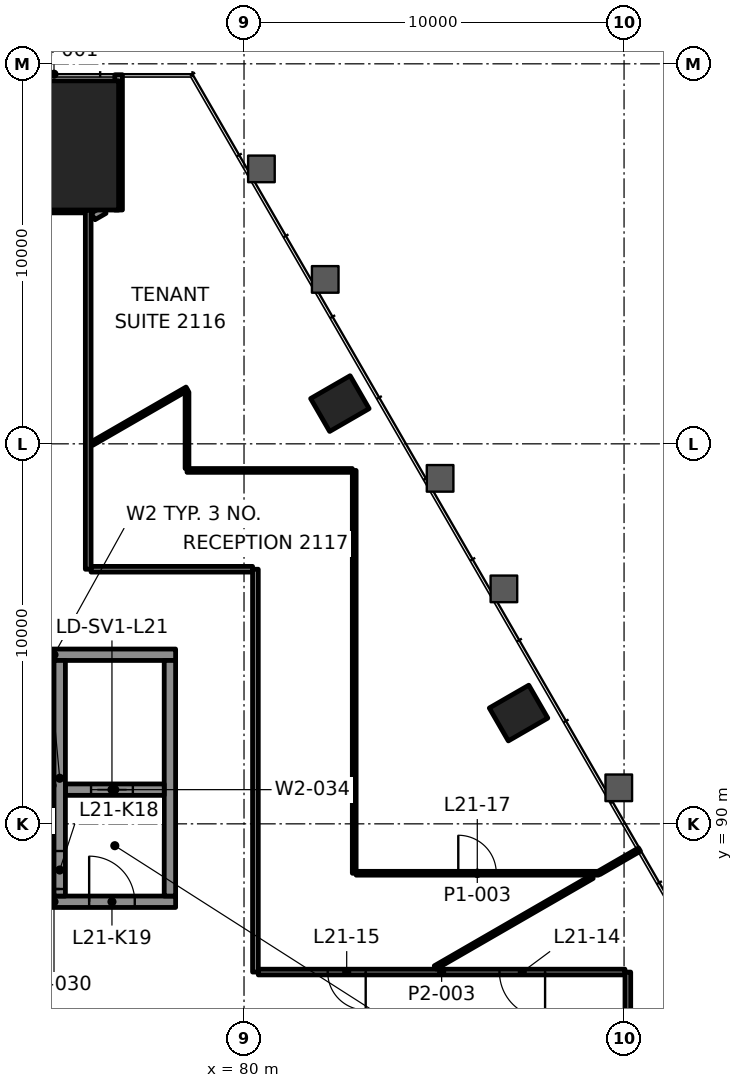
"""IFC4 building model, lengths in metres.
Left out: names, types, materials, properties, quantities, classifications, styles, units other than length and angle.
Written with IfcOpenShell. Run it as: python <this file> out.ifc"""

import sys

from ifc_helpers import new_model, si_unit, direction, frame, frame_2d, origin, origin_2d, place, context, subcontext, project, spatial, rectangle, extrude, element, fill, save


model = new_model("IFC4")
c1 = context("Model", 3, precision=1e-05, world=origin(), true_north=direction((0.0, 1.0)))
c2 = subcontext(c1, "Body", "Model", "MODEL_VIEW")
j1 = project(units=[si_unit("LENGTHUNIT", "METRE"), si_unit("PLANEANGLEUNIT", "RADIAN")], contexts=[c1])
p1 = place(None, origin())
s1 = spatial("IfcSite", under=j1, at=p1, CompositionType="ELEMENT")
p2 = place(p1, origin())
s2 = spatial("IfcBuilding", under=s1, at=p2, CompositionType="ELEMENT")
p3 = place(p2, frame((0.0, 0.0, 94.6)))
s3 = spatial("IfcBuildingStorey", under=s2, at=p3, CompositionType="ELEMENT", Elevation=94.6)
p4 = place(p3, frame((75.0, 107.853, 0.0), z_axis=(0.0, 0.0, 1.0), x_axis=(-1.0, 0.0, 0.0)))
e1 = element("IfcColumn", 1, at=p4, inside=s3, PredefinedType="COLUMN", context=c2, shape_type="SweptSolid", body=[
    extrude(rectangle(XDim=3.4, YDim=3.4, at=origin_2d()), origin(), (0.0, 0.0, 1.0), 4.2),
])
for number, where, z_axis, x_axis in (
    (2, (87.224, 92.916, -0.0), (0.0, 0.0, 1.0), (-0.5, 0.866, 0.0)),
    (3, (82.522, 101.059, -0.0), (0.0, 0.0, 1.0), (-0.5, 0.866, 0.0)),
):
    element("IfcColumn", number, at=place(p3, frame(where, z_axis=z_axis, x_axis=x_axis)), inside=s3, PredefinedType="COLUMN", context=c2, shape_type="SweptSolid", body=[
        extrude(rectangle(XDim=1.0, YDim=1.2, at=origin_2d()), origin(), (0.0, 0.0, 1.0), 4.2),
    ])
p5 = place(p3, frame((71.8, 87.95, 0.0), z_axis=(0.0, 0.0, 1.0), x_axis=(1.0, 0.0, 0.0)))
e4 = element("IfcWall", 4, at=p5, inside=s3, PredefinedType="SHEAR", context=c2, shape_type="SweptSolid", body=[
    extrude(rectangle(XDim=6.4, YDim=0.3, at=frame_2d((3.2, 0.0))), origin(), (0.0, 0.0, 1.0), 4.0),
])
p6 = place(p5, frame((1.325, 0.0, 0.0)))
e5 = element("IfcOpeningElement", 5, at=p6, cuts=e4, PredefinedType="OPENING", context=c2, shape_type="SweptSolid", body=[
    extrude(rectangle(XDim=1.0, YDim=2.1, at=frame_2d((0.5, 1.05))), frame((0.0, 0.16, 0.0), z_axis=(0.0, -1.0, 0.0), x_axis=(1.0, 0.0, 0.0)), (0.0, 0.0, 1.0), 0.32),
])
p7 = place(p5, frame((4.125, 0.0, 0.0)))
e6 = element("IfcOpeningElement", 6, at=p7, cuts=e4, PredefinedType="OPENING", context=c2, shape_type="SweptSolid", body=[
    extrude(rectangle(XDim=1.2, YDim=2.1, at=frame_2d((0.6, 1.05))), frame((0.0, 0.16, 0.0), z_axis=(0.0, -1.0, 0.0), x_axis=(1.0, 0.0, 0.0)), (0.0, 0.0, 1.0), 0.32),
])
p8 = place(p3, frame((71.8, 94.45, 0.0), z_axis=(0.0, 0.0, 1.0), x_axis=(1.0, 0.0, 0.0)))
e7 = element("IfcWall", 7, at=p8, inside=s3, PredefinedType="SHEAR", context=c2, shape_type="SweptSolid", body=[
    extrude(rectangle(XDim=6.4, YDim=0.3, at=frame_2d((3.2, 0.0))), origin(), (0.0, 0.0, 1.0), 4.0),
])
p9 = place(p3, frame((78.05, 88.1, 0.0), z_axis=(0.0, 0.0, 1.0), x_axis=(0.0, 1.0, 0.0)))
e8 = element("IfcWall", 8, at=p9, inside=s3, PredefinedType="SHEAR", context=c2, shape_type="SweptSolid", body=[
    extrude(rectangle(XDim=6.2, YDim=0.3, at=frame_2d((3.1, 0.0))), origin(), (0.0, 0.0, 1.0), 4.0),
])
p10 = place(p3, frame((75.3, 90.9, 0.0), z_axis=(0.0, 0.0, 1.0), x_axis=(1.0, 0.0, 0.0)))
e9 = element("IfcWall", 9, at=p10, inside=s3, PredefinedType="SHEAR", context=c2, shape_type="SweptSolid", body=[
    extrude(rectangle(XDim=2.6, YDim=0.3, at=frame_2d((1.3, 0.0))), origin(), (0.0, 0.0, 1.0), 4.0),
])
p11 = place(p10, frame((0.675, 0.0, 0.0)))
e10 = element("IfcOpeningElement", 10, at=p11, cuts=e9, PredefinedType="OPENING", context=c2, shape_type="SweptSolid", body=[
    extrude(rectangle(XDim=1.1, YDim=2.1, at=frame_2d((0.55, 1.05))), frame((0.0, 0.16, 0.0), z_axis=(0.0, -1.0, 0.0), x_axis=(1.0, 0.0, 0.0)), (0.0, 0.0, 1.0), 0.32),
])
p12 = place(p3, frame((75.15, 88.1, 0.0), z_axis=(0.0, 0.0, 1.0), x_axis=(0.0, 1.0, 0.0)))
e11 = element("IfcWall", 11, at=p12, inside=s3, PredefinedType="SHEAR", context=c2, shape_type="SweptSolid", body=[
    extrude(rectangle(XDim=6.2, YDim=0.3, at=frame_2d((3.1, 0.0))), origin(), (0.0, 0.0, 1.0), 4.0),
])
p13 = place(p12, frame((0.185, 0.0, 0.0)))
e12 = element("IfcOpeningElement", 12, at=p13, cuts=e11, PredefinedType="OPENING", context=c2, shape_type="SweptSolid", body=[
    extrude(rectangle(XDim=1.0, YDim=2.1, at=frame_2d((0.5, 1.05))), frame((0.0, 0.16, 0.0), z_axis=(0.0, -1.0, 0.0), x_axis=(1.0, 0.0, 0.0)), (0.0, 0.0, 1.0), 0.32),
])
p14 = place(p3, frame((90.024, 86.1, 0.0), z_axis=(0.0, 0.0, 1.0), x_axis=(-1.0, 0.0, 0.0)))
e13 = element("IfcWall", 13, at=p14, inside=s3, PredefinedType="PARTITIONING", context=c2, shape_type="SweptSolid", body=[
    extrude(rectangle(XDim=9.649, YDim=0.15, at=frame_2d((4.825, 0.0))), origin(), (0.0, 0.0, 1.0), 3.4),
])
p15 = place(p14, frame((2.103, 0.0, 0.0)))
e14 = element("IfcOpeningElement", 14, at=p15, cuts=e13, PredefinedType="OPENING", context=c2, shape_type="SweptSolid", body=[
    extrude(rectangle(XDim=1.2, YDim=2.1, at=frame_2d((0.6, 1.05))), frame((0.0, 0.085, 0.0), z_axis=(0.0, -1.0, 0.0), x_axis=(1.0, 0.0, 0.0)), (0.0, 0.0, 1.0), 0.17),
])
p16 = place(p14, frame((6.823, 0.0, 0.0)))
e15 = element("IfcOpeningElement", 15, at=p16, cuts=e13, PredefinedType="OPENING", context=c2, shape_type="SweptSolid", body=[
    extrude(rectangle(XDim=1.0, YDim=2.1, at=frame_2d((0.5, 1.05))), frame((0.0, 0.085, 0.0), z_axis=(0.0, -1.0, 0.0), x_axis=(1.0, 0.0, 0.0)), (0.0, 0.0, 1.0), 0.17),
])
p17 = place(p3, frame((82.95, 88.7, 0.0), z_axis=(0.0, 0.0, 1.0), x_axis=(1.0, 0.0, 0.0)))
e16 = element("IfcWall", 16, at=p17, inside=s3, PredefinedType="PARTITIONING", context=c2, shape_type="SweptSolid", body=[
    extrude(rectangle(XDim=6.376, YDim=0.1, at=frame_2d((3.188, 0.0))), origin(), (0.0, 0.0, 1.0), 3.4),
])
p18 = place(p17, frame((2.688, 0.0, 0.0)))
e17 = element("IfcOpeningElement", 17, at=p18, cuts=e16, PredefinedType="OPENING", context=c2, shape_type="SweptSolid", body=[
    extrude(rectangle(XDim=1.0, YDim=2.1, at=frame_2d((0.5, 1.05))), frame((0.0, 0.06, 0.0), z_axis=(0.0, -1.0, 0.0), x_axis=(1.0, 0.0, 0.0)), (0.0, 0.0, 1.0), 0.12),
])
p19 = place(p3, frame((75.975, 96.7, 0.0), z_axis=(0.0, 0.0, 1.0), x_axis=(1.0, 0.0, 0.0)))
e18 = element("IfcWall", 18, at=p19, inside=s3, PredefinedType="PARTITIONING", context=c2, shape_type="SweptSolid", body=[
    extrude(rectangle(XDim=4.25, YDim=0.15, at=frame_2d((2.125, 0.0))), origin(), (0.0, 0.0, 1.0), 3.4),
])
p20 = place(p3, frame((78.5, 99.3, 0.0), z_axis=(0.0, 0.0, 1.0), x_axis=(1.0, 0.0, 0.0)))
e19 = element("IfcWall", 19, at=p20, inside=s3, PredefinedType="PARTITIONING", context=c2, shape_type="SweptSolid", body=[
    extrude(rectangle(XDim=4.35, YDim=0.1, at=frame_2d((2.175, 0.0))), origin(), (0.0, 0.0, 1.0), 3.4),
])
p21 = place(p3, frame((74.176, 106.153, 0.0), z_axis=(0.0, 0.0, 1.0), x_axis=(1.0, 0.0, 0.0)))
e20 = element("IfcWall", 20, at=p21, inside=s3, PredefinedType="PARTITIONING", context=c2, shape_type="SweptSolid", body=[
    extrude(rectangle(XDim=1.649, YDim=0.15, at=frame_2d((0.824, 0.0))), origin(), (0.0, 0.0, 1.0), 3.397),
])
p22 = place(p3, frame((85.03, 86.22, 0.0), z_axis=(0.0, 0.0, 1.0), x_axis=(0.86602800421, 0.499995495904, 0.0)))
e21 = element("IfcWall", 21, at=p22, inside=s3, PredefinedType="PARTITIONING", context=c2, shape_type="SweptSolid", body=[
    extrude(rectangle(XDim=4.773, YDim=0.1, at=frame_2d((2.386, 0.0))), origin(), (0.0, 0.0, 1.0), 3.4),
])
p23 = place(p3, frame((76.001, 100.008, 0.0), z_axis=(0.0, 0.0, 1.0), x_axis=(0.866016514357, 0.500015396624, 0.0)))
e22 = element("IfcWall", 22, at=p23, inside=s3, PredefinedType="PARTITIONING", context=c2, shape_type="SweptSolid", body=[
    extrude(rectangle(XDim=2.886, YDim=0.1, at=frame_2d((1.443, 0.0))), origin(), (0.0, 0.0, 1.0), 3.4),
])
p24 = place(p3, frame((76.028, 105.984, 0.0), z_axis=(0.0, 0.0, 1.0), x_axis=(0.866137275136, 0.499806183056, 0.0)))
e23 = element("IfcWall", 23, at=p24, inside=s3, PredefinedType="PARTITIONING", context=c2, shape_type="SweptSolid", body=[
    extrude(rectangle(XDim=0.337, YDim=0.2, at=frame_2d((0.168, 0.0))), origin(), (0.0, 0.0, 1.0), 3.4),
])
p25 = place(p3, frame((90.1, 67.321, 0.0), z_axis=(0.0, 0.0, 1.0), x_axis=(0.0, 1.0, 0.0)))
e24 = element("IfcWall", 24, at=p25, inside=s3, PredefinedType="PARTITIONING", context=c2, shape_type="SweptSolid", body=[
    extrude(rectangle(XDim=18.778, YDim=0.15, at=frame_2d((9.389, 0.0))), origin(), (0.0, 0.0, 1.0), 3.4),
])
p26 = place(p3, frame((82.9, 88.7, 0.0), z_axis=(0.0, 0.0, 1.0), x_axis=(0.0, 1.0, 0.0)))
e25 = element("IfcWall", 25, at=p26, inside=s3, PredefinedType="PARTITIONING", context=c2, shape_type="SweptSolid", body=[
    extrude(rectangle(XDim=10.6, YDim=0.1, at=frame_2d((5.3, 0.0))), origin(), (0.0, 0.0, 1.0), 3.322),
])
p27 = place(p3, frame((80.3, 86.1, 0.0), z_axis=(0.0, 0.0, 1.0), x_axis=(0.0, 1.0, 0.0)))
e26 = element("IfcWall", 26, at=p27, inside=s3, PredefinedType="PARTITIONING", context=c2, shape_type="SweptSolid", body=[
    extrude(rectangle(XDim=10.6, YDim=0.15, at=frame_2d((5.3, 0.0))), origin(), (0.0, 0.0, 1.0), 3.322),
])
p28 = place(p3, frame((78.5, 99.35, 0.0), z_axis=(0.0, 0.0, 1.0), x_axis=(0.0, 1.0, 0.0)))
e27 = element("IfcWall", 27, at=p28, inside=s3, PredefinedType="PARTITIONING", context=c2, shape_type="SweptSolid", body=[
    extrude(rectangle(XDim=2.014, YDim=0.1, at=frame_2d((1.007, 0.0))), origin(), (0.0, 0.0, 1.0), 3.4),
])
p29 = place(p3, frame((76.7, 106.153, 0.0), z_axis=(0.0, 0.0, 1.0), x_axis=(0.0, 1.0, 0.0)))
e28 = element("IfcWall", 28, at=p29, inside=s3, PredefinedType="PARTITIONING", context=c2, shape_type="SweptSolid", body=[
    extrude(rectangle(XDim=3.559, YDim=0.2, at=frame_2d((1.78, 0.0))), origin(), (0.0, 0.0, 1.0), 3.4),
])
p30 = place(p3, frame((75.9, 96.7, 0.0), z_axis=(0.0, 0.0, 1.0), x_axis=(0.0, 1.0, 0.0)))
e29 = element("IfcWall", 29, at=p30, inside=s3, PredefinedType="PARTITIONING", context=c2, shape_type="SweptSolid", body=[
    extrude(rectangle(XDim=9.452, YDim=0.15, at=frame_2d((4.726, 0.0))), origin(), (0.0, 0.0, 1.0), 3.4),
])
p31 = place(p3, frame((89.347, 88.713, 0.0), z_axis=(0.0, 0.0, 1.0), x_axis=(0.866109108303, 0.499854991488, 0.0)))
e30 = element("IfcWall", 30, at=p31, inside=s3, PredefinedType="PARTITIONING", context=c2, shape_type="SweptSolid", body=[
    extrude(rectangle(XDim=1.222, YDim=0.1, at=frame_2d((0.611, 0.0))), origin(), (0.0, 0.0, 1.0), 3.165),
])
p32 = place(p15, origin())
e31 = element("IfcDoor", 31, at=p32, inside=s3, OperationType="DOUBLE_DOOR_SINGLE_SWING", PredefinedType="DOOR", context=c2, shape_type="SweptSolid", body=[
    extrude(rectangle(XDim=1.2, YDim=2.1, at=frame_2d((0.6, 1.05))), frame((0.0, 0.025, 0.0), z_axis=(0.0, -1.0, 0.0), x_axis=(1.0, 0.0, 0.0)), (0.0, 0.0, 1.0), 0.05),
])
fill(e14, e31)
p33 = place(p16, origin())
e32 = element("IfcDoor", 32, at=p33, inside=s3, OperationType="SINGLE_SWING_LEFT", PredefinedType="DOOR", context=c2, shape_type="SweptSolid", body=[
    extrude(rectangle(XDim=1.0, YDim=2.1, at=frame_2d((0.5, 1.05))), frame((0.0, 0.025, 0.0), z_axis=(0.0, -1.0, 0.0), x_axis=(1.0, 0.0, 0.0)), (0.0, 0.0, 1.0), 0.05),
])
fill(e15, e32)
p34 = place(p18, origin())
e33 = element("IfcDoor", 33, at=p34, inside=s3, OperationType="SINGLE_SWING_LEFT", PredefinedType="DOOR", context=c2, shape_type="SweptSolid", body=[
    extrude(rectangle(XDim=1.0, YDim=2.1, at=frame_2d((0.5, 1.05))), frame((0.0, 0.025, 0.0), z_axis=(0.0, -1.0, 0.0), x_axis=(1.0, 0.0, 0.0)), (0.0, 0.0, 1.0), 0.05),
])
fill(e17, e33)
p35 = place(p11, origin())
e34 = element("IfcDoor", 34, at=p35, inside=s3, OperationType="DOUBLE_DOOR_SLIDING", PredefinedType="DOOR", context=c2, shape_type="SweptSolid", body=[
    extrude(rectangle(XDim=1.1, YDim=2.1, at=frame_2d((0.55, 1.05))), frame((0.0, 0.025, 0.0), z_axis=(0.0, -1.0, 0.0), x_axis=(1.0, 0.0, 0.0)), (0.0, 0.0, 1.0), 0.05),
])
fill(e10, e34)
p36 = place(p13, origin())
e35 = element("IfcDoor", 35, at=p36, inside=s3, OperationType="SINGLE_SWING_LEFT", PredefinedType="DOOR", context=c2, shape_type="SweptSolid", body=[
    extrude(rectangle(XDim=1.0, YDim=2.1, at=frame_2d((0.5, 1.05))), frame((0.0, 0.025, 0.0), z_axis=(0.0, -1.0, 0.0), x_axis=(1.0, 0.0, 0.0)), (0.0, 0.0, 1.0), 0.05),
])
fill(e12, e35)
p37 = place(p7, origin())
e36 = element("IfcDoor", 36, at=p37, inside=s3, OperationType="SINGLE_SWING_RIGHT", PredefinedType="DOOR", context=c2, shape_type="SweptSolid", body=[
    extrude(rectangle(XDim=1.2, YDim=2.1, at=frame_2d((0.6, 1.05))), frame((0.0, 0.025, 0.0), z_axis=(0.0, -1.0, 0.0), x_axis=(1.0, 0.0, 0.0)), (0.0, 0.0, 1.0), 0.05),
])
fill(e6, e36)
save(model, sys.argv[1])
